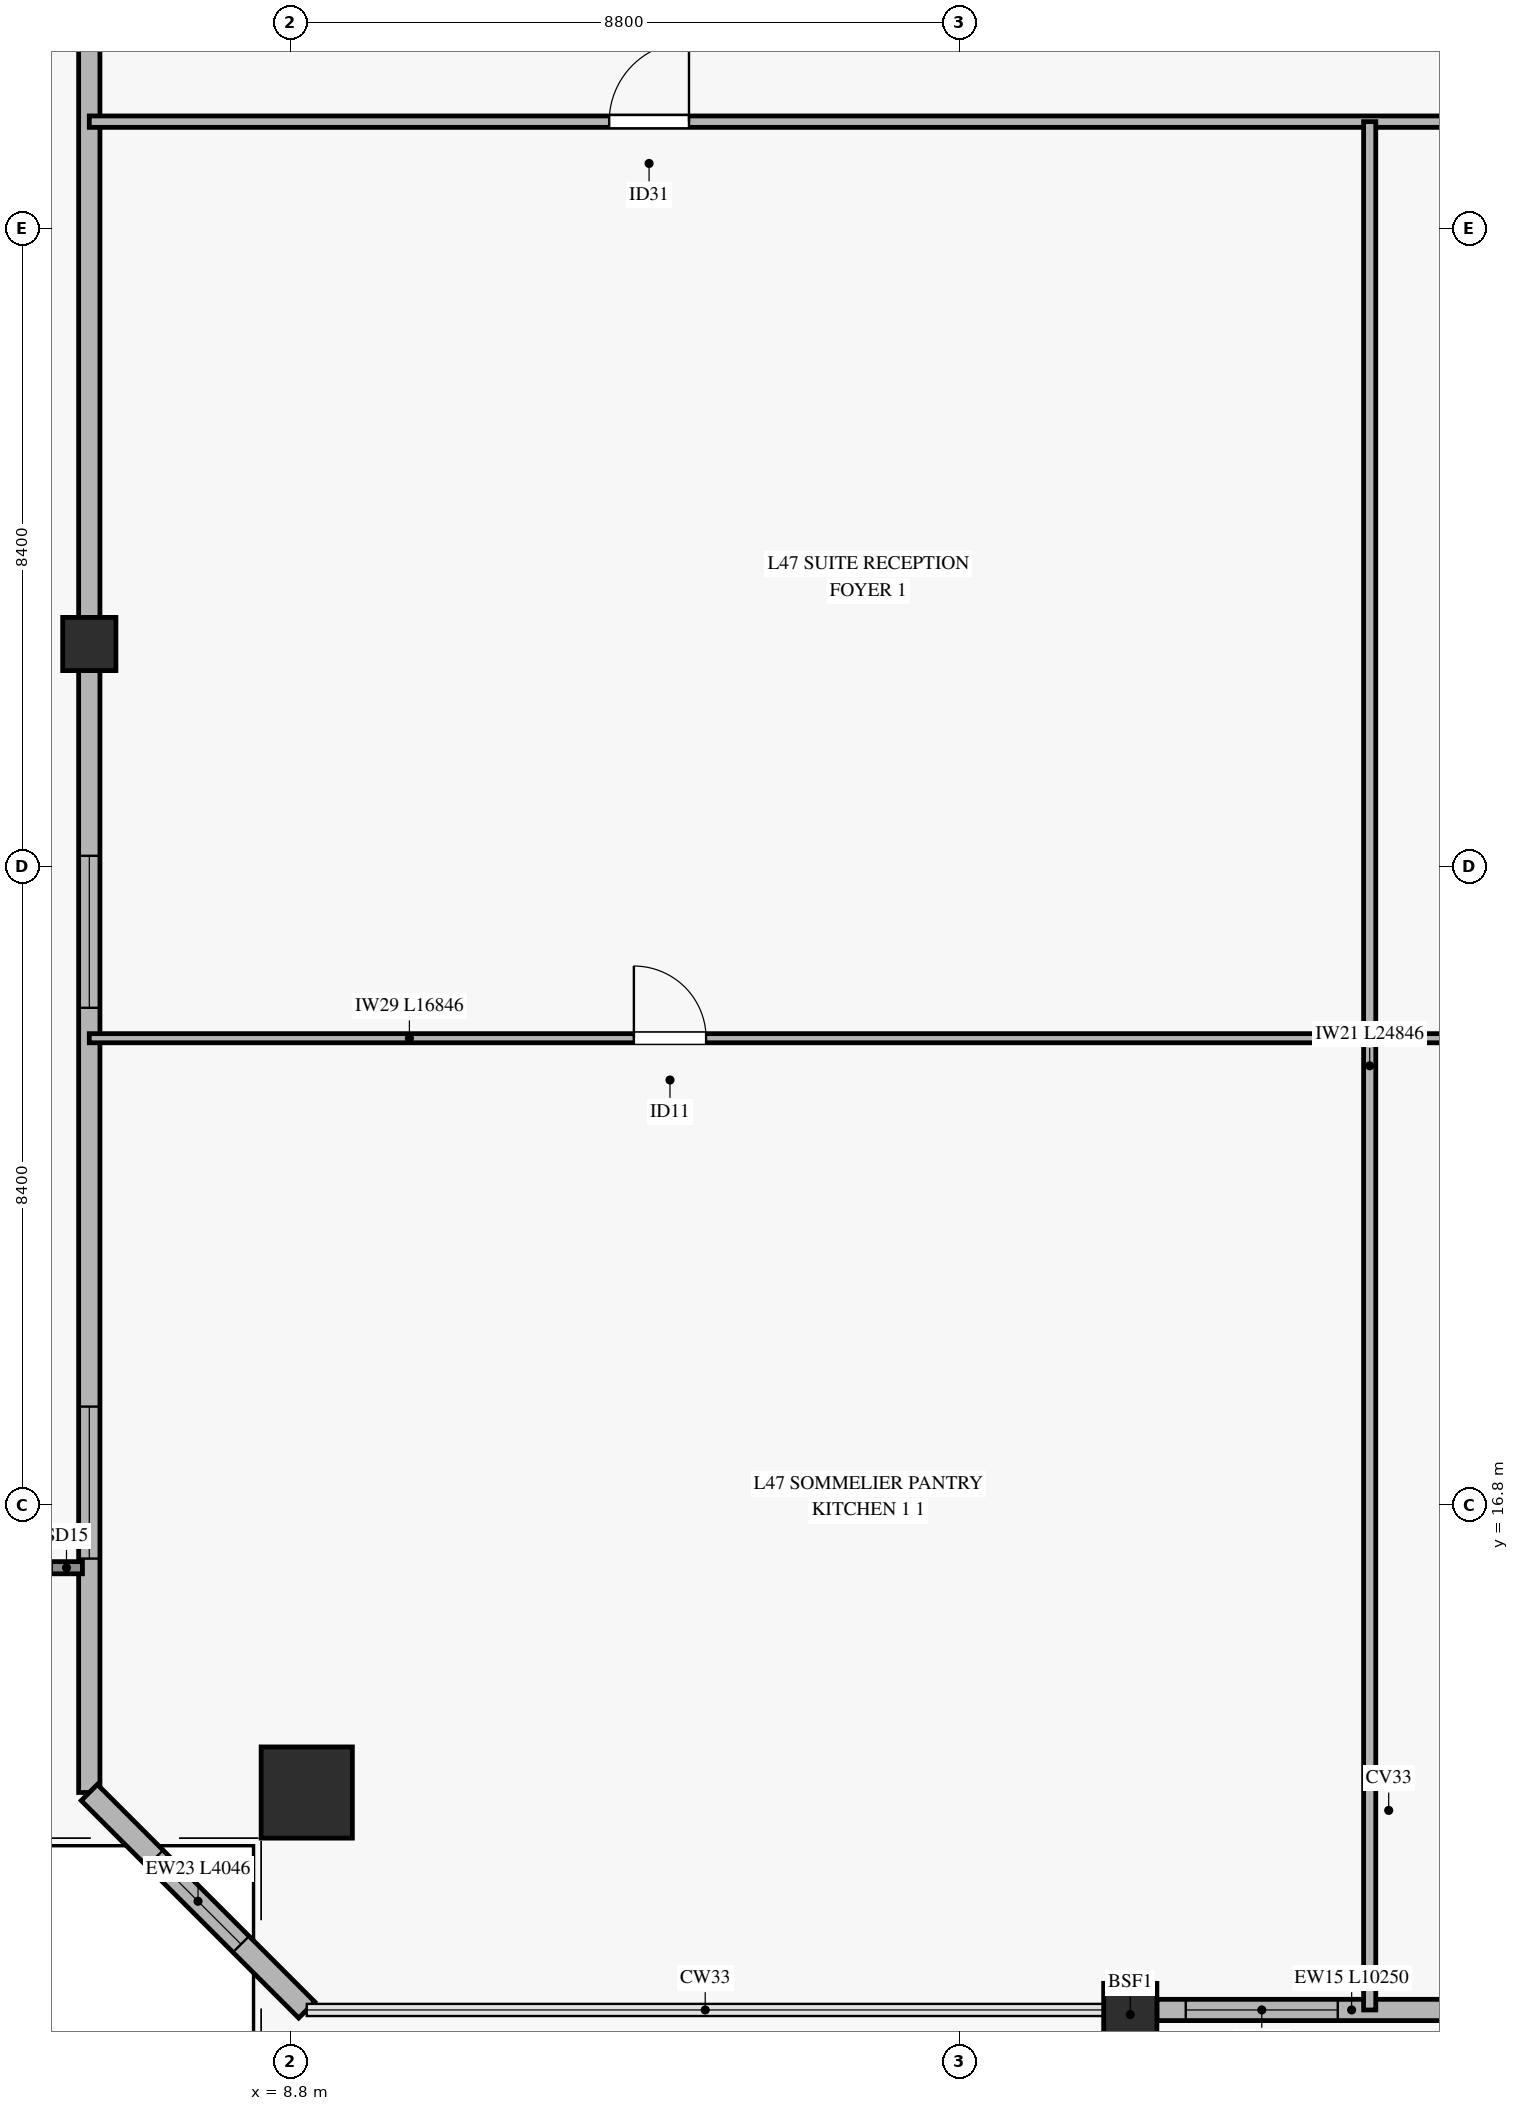
"""IFC4 building model, lengths in metres.
Left out: names, types, materials, properties, quantities, classifications, styles, units other than length and angle.
Written with IfcOpenShell. Run it as: python <this file> out.ifc"""

import sys

from ifc_helpers import new_model, si_unit, direction, frame, frame_2d, origin, origin_2d, place, context, subcontext, project, spatial, rectangle, hollow_rectangle, extrude, source, transform, mapped, element, fill, save


model = new_model("IFC4")
c1 = context("Model", 3, precision=1e-05, world=origin(), true_north=direction((0.0, 1.0)))
c2 = subcontext(c1, "Body", "Model", "MODEL_VIEW")
j1 = project(units=[si_unit("LENGTHUNIT", "METRE"), si_unit("PLANEANGLEUNIT", "RADIAN")], contexts=[c1])
p1 = place(None, origin())
s1 = spatial("IfcSite", under=j1, at=p1, CompositionType="ELEMENT")
p2 = place(p1, origin())
s2 = spatial("IfcBuilding", under=s1, at=p2, CompositionType="ELEMENT")
p3 = place(p2, frame((0.0, 0.0, 187.7)))
s3 = spatial("IfcBuildingStorey", under=s2, at=p3, CompositionType="ELEMENT", Elevation=187.7)
m1 = source(origin(), c2, "Body", "SweptSolid", [
    extrude(hollow_rectangle(XDim=1.2, YDim=1.2, WallThickness=0.055, at=origin_2d()), origin(), (0.0, 0.0, 1.0), 3.265),
])
p4 = place(p3, frame((9.015, 13.015, 0.0), z_axis=(0.064076942579, 0.153126695918, 0.986126949448), x_axis=(-0.922489486146, 0.386022211732, 0.0)))
e1 = element("IfcColumn", 1, at=p4, inside=s3, PredefinedType="COLUMN", context=c2, shape_type="MappedRepresentation", body=[
    mapped(m1, transform((0.0, 0.0, 0.0), x_axis=(1.0, 0.0, 0.0), y_axis=(0.0, 1.0, 0.0), z_axis=(0.0, 0.0, 1.0), scale=1.0)),
])
m2 = source(origin(), c2, "Body", "SweptSolid", [
    extrude(hollow_rectangle(XDim=0.7, YDim=0.7, WallThickness=0.032, at=origin_2d()), origin(), (0.0, 0.0, 1.0), 3.263),
])
p5 = place(p3, frame((19.85, 10.154, 0.0), z_axis=(0.0, 0.161182473027, 0.986924622445), x_axis=(-1.0, 0.0, 0.0)))
e2 = element("IfcColumn", 2, at=p5, inside=s3, PredefinedType="COLUMN", context=c2, shape_type="MappedRepresentation", body=[
    mapped(m2, transform((0.0, 0.0, 0.0), x_axis=(1.0, 0.0, 0.0), y_axis=(0.0, 1.0, 0.0), z_axis=(0.0, 0.0, 1.0), scale=1.0)),
])
m3 = source(origin(), c2, "Body", "SweptSolid", [
    extrude(hollow_rectangle(XDim=0.7, YDim=0.7, WallThickness=0.032, at=origin_2d()), origin(), (0.0, 0.0, 1.0), 3.239),
])
p6 = place(p3, frame((6.154, 28.127, 0.0), z_axis=(0.072506249941, 0.081173836992, 0.994059179278), x_axis=(-0.745802491979, 0.666167128398, 0.0)))
e3 = element("IfcColumn", 3, at=p6, inside=s3, PredefinedType="COLUMN", context=c2, shape_type="MappedRepresentation", body=[
    mapped(m3, transform((0.0, 0.0, 0.0), x_axis=(1.0, 0.0, 0.0), y_axis=(0.0, 1.0, 0.0), z_axis=(0.0, 0.0, 1.0), scale=1.0)),
])
p7 = place(p3, frame((20.2, 10.154, 0.0), z_axis=(0.0, 0.0, 1.0), x_axis=(1.0, 0.0, 0.0)))
e4 = element("IfcWall", 4, at=p7, inside=s3, PredefinedType="SOLIDWALL", context=c2, shape_type="SweptSolid", body=[
    extrude(rectangle(XDim=10.25, YDim=0.28, at=frame_2d((5.125, 0.0))), origin(), (0.0, 0.0, 1.0), 2.7),
])
p8 = place(p7, frame((4.2, 0.0, 0.0)))
e5 = element("IfcOpeningElement", 5, at=p8, cuts=e4, PredefinedType="OPENING", context=c2, shape_type="SweptSolid", body=[
    extrude(rectangle(XDim=1.8, YDim=2.25, at=frame_2d((0.9, 1.125))), frame((0.0, 0.15, 0.0), z_axis=(0.0, -1.0, 0.0), x_axis=(1.0, 0.0, 0.0)), (0.0, 0.0, 1.0), 0.3),
])
p9 = place(p7, frame((0.38, 0.0, 0.35)))
e6 = element("IfcOpeningElement", 6, at=p9, cuts=e4, PredefinedType="OPENING", context=c2, shape_type="SweptSolid", body=[
    extrude(rectangle(XDim=2.0, YDim=2.0, at=frame_2d((1.0, 1.0))), frame((0.0, 0.15, 0.0), z_axis=(0.0, -1.0, 0.0), x_axis=(1.0, 0.0, 0.0)), (0.0, 0.0, 1.0), 0.3),
])
p10 = place(p7, frame((7.35, 0.0, 0.35)))
e7 = element("IfcOpeningElement", 7, at=p10, cuts=e4, PredefinedType="OPENING", context=c2, shape_type="SweptSolid", body=[
    extrude(rectangle(XDim=1.6, YDim=2.0, at=frame_2d((0.8, 1.0))), frame((0.0, 0.15, 0.0), z_axis=(0.0, -1.0, 0.0), x_axis=(1.0, 0.0, 0.0)), (0.0, 0.0, 1.0), 0.3),
])
p11 = place(p3, frame((6.154, 13.015, 0.0), z_axis=(0.0, 0.0, 1.0), x_axis=(0.0, 1.0, 0.0)))
e8 = element("IfcWall", 8, at=p11, inside=s3, PredefinedType="SOLIDWALL", context=c2, shape_type="SweptSolid", body=[
    extrude(rectangle(XDim=14.762, YDim=0.28, at=frame_2d((7.381, 0.0))), origin(), (0.0, 0.0, 1.0), 2.7),
])
p12 = place(p11, frame((3.078, 0.0, 0.45)))
e9 = element("IfcOpeningElement", 9, at=p12, cuts=e8, PredefinedType="OPENING", context=c2, shape_type="SweptSolid", body=[
    extrude(rectangle(XDim=2.0, YDim=2.0, at=frame_2d((1.0, 1.0))), frame((0.0, 0.15, 0.0), z_axis=(0.0, -1.0, 0.0), x_axis=(1.0, 0.0, 0.0)), (0.0, 0.0, 1.0), 0.3),
])
p13 = place(p11, frame((10.325, 0.0, 0.45)))
e10 = element("IfcOpeningElement", 10, at=p13, cuts=e8, PredefinedType="OPENING", context=c2, shape_type="SweptSolid", body=[
    extrude(rectangle(XDim=2.0, YDim=2.0, at=frame_2d((1.0, 1.0))), frame((0.0, 0.15, 0.0), z_axis=(0.0, -1.0, 0.0), x_axis=(1.0, 0.0, 0.0)), (0.0, 0.0, 1.0), 0.3),
])
p14 = place(p3, frame((6.154, 28.477, 0.0), z_axis=(0.0, 0.0, 1.0), x_axis=(0.0, 1.0, 0.0)))
e11 = element("IfcWall", 11, at=p14, inside=s3, PredefinedType="SOLIDWALL", context=c2, shape_type="SweptSolid", body=[
    extrude(rectangle(XDim=14.762, YDim=0.28, at=frame_2d((7.381, 0.0))), origin(), (0.0, 0.0, 1.0), 2.7),
])
p15 = place(p14, frame((9.378, 0.0, 0.45)))
e12 = element("IfcOpeningElement", 12, at=p15, cuts=e11, PredefinedType="OPENING", context=c2, shape_type="SweptSolid", body=[
    extrude(rectangle(XDim=2.0, YDim=2.0, at=frame_2d((1.0, 1.0))), frame((0.0, 0.15, 0.0), z_axis=(0.0, -1.0, 0.0), x_axis=(1.0, 0.0, 0.0)), (0.0, 0.0, 1.0), 0.3),
])
p16 = place(p3, frame((6.154, 13.015, 0.0), z_axis=(0.0, 0.0, 1.0), x_axis=(0.707106781187, -0.707106781187, 0.0)))
e13 = element("IfcWall", 13, at=p16, inside=s3, PredefinedType="SOLIDWALL", context=c2, shape_type="SweptSolid", body=[
    extrude(rectangle(XDim=4.046, YDim=0.3, at=frame_2d((2.023, 0.0))), origin(), (0.0, 0.0, 1.0), 2.7),
])
p17 = place(p16, frame((1.223, 0.0, 0.45)))
e14 = element("IfcOpeningElement", 14, at=p17, cuts=e13, PredefinedType="OPENING", context=c2, shape_type="SweptSolid", body=[
    extrude(rectangle(XDim=1.6, YDim=2.0, at=frame_2d((0.8, 1.0))), frame((0.0, 0.16, 0.0), z_axis=(0.0, -1.0, 0.0), x_axis=(1.0, 0.0, 0.0)), (0.0, 0.0, 1.0), 0.32),
])
p18 = place(p3, frame((6.154, 35.0, 0.0), z_axis=(0.0, 0.0, 1.0), x_axis=(1.0, 0.0, 0.0)))
e15 = element("IfcWall", 15, at=p18, inside=s3, PredefinedType="PARTITIONING", context=c2, shape_type="SweptSolid", body=[
    extrude(rectangle(XDim=58.093, YDim=0.15, at=frame_2d((29.046, 0.0))), origin(), (0.0, 0.0, 1.0), 2.405),
])
p19 = place(p18, frame((6.84, 0.0, 0.0)))
e16 = element("IfcOpeningElement", 16, at=p19, cuts=e15, PredefinedType="OPENING", context=c2, shape_type="SweptSolid", body=[
    extrude(rectangle(XDim=1.05, YDim=2.15, at=frame_2d((0.525, 1.075))), frame((0.0, 0.085, 0.0), z_axis=(0.0, -1.0, 0.0), x_axis=(1.0, 0.0, 0.0)), (0.0, 0.0, 1.0), 0.17),
])
p20 = place(p18, frame((19.523, 0.0, 0.0)))
e17 = element("IfcOpeningElement", 17, at=p20, cuts=e15, PredefinedType="OPENING", context=c2, shape_type="SweptSolid", body=[
    extrude(rectangle(XDim=1.05, YDim=2.15, at=frame_2d((0.525, 1.075))), frame((0.0, 0.085, 0.0), z_axis=(0.0, -1.0, 0.0), x_axis=(1.0, 0.0, 0.0)), (0.0, 0.0, 1.0), 0.17),
])
p21 = place(p18, frame((26.123, 0.0, 0.0)))
e18 = element("IfcOpeningElement", 18, at=p21, cuts=e15, PredefinedType="OPENING", context=c2, shape_type="SweptSolid", body=[
    extrude(rectangle(XDim=1.05, YDim=2.15, at=frame_2d((0.525, 1.075))), frame((0.0, 0.085, 0.0), z_axis=(0.0, -1.0, 0.0), x_axis=(1.0, 0.0, 0.0)), (0.0, 0.0, 1.0), 0.17),
])
p22 = place(p18, frame((32.616, 0.0, 0.0)))
e19 = element("IfcOpeningElement", 19, at=p22, cuts=e15, PredefinedType="OPENING", context=c2, shape_type="SweptSolid", body=[
    extrude(rectangle(XDim=1.05, YDim=2.15, at=frame_2d((0.525, 1.075))), frame((0.0, 0.085, 0.0), z_axis=(0.0, -1.0, 0.0), x_axis=(1.0, 0.0, 0.0)), (0.0, 0.0, 1.0), 0.17),
])
p23 = place(p18, frame((44.8, 0.0, 0.0)))
e20 = element("IfcOpeningElement", 20, at=p23, cuts=e15, PredefinedType="OPENING", context=c2, shape_type="SweptSolid", body=[
    extrude(rectangle(XDim=1.05, YDim=2.15, at=frame_2d((0.525, 1.075))), frame((0.0, 0.085, 0.0), z_axis=(0.0, -1.0, 0.0), x_axis=(1.0, 0.0, 0.0)), (0.0, 0.0, 1.0), 0.17),
])
p24 = place(p3, frame((6.154, 22.94, 0.0), z_axis=(0.0, 0.0, 1.0), x_axis=(1.0, 0.0, 0.0)))
e21 = element("IfcWall", 21, at=p24, inside=s3, PredefinedType="PARTITIONING", context=c2, shape_type="SweptSolid", body=[
    extrude(rectangle(XDim=16.846, YDim=0.12, at=frame_2d((8.423, 0.0))), origin(), (0.0, 0.0, 1.0), 2.405),
])
p25 = place(p24, frame((7.165, 0.0, 0.0)))
e22 = element("IfcOpeningElement", 22, at=p25, cuts=e21, PredefinedType="OPENING", context=c2, shape_type="SweptSolid", body=[
    extrude(rectangle(XDim=0.95, YDim=2.1, at=frame_2d((0.475, 1.05))), frame((0.0, 0.07, 0.0), z_axis=(0.0, -1.0, 0.0), x_axis=(1.0, 0.0, 0.0)), (0.0, 0.0, 1.0), 0.14),
])
p26 = place(p3, frame((23.0, 10.154, 0.0), z_axis=(0.0, 0.0, 1.0), x_axis=(0.0, 1.0, 0.0)))
e23 = element("IfcWall", 23, at=p26, inside=s3, PredefinedType="PARTITIONING", context=c2, shape_type="SweptSolid", body=[
    extrude(rectangle(XDim=24.846, YDim=0.16, at=frame_2d((12.423, 0.0))), origin(), (0.0, 0.0, 1.0), 2.705),
])
p27 = place(p3, frame((23.0, 22.94, 0.0), z_axis=(0.0, 0.0, 1.0), x_axis=(1.0, 0.0, 0.0)))
e24 = element("IfcWall", 24, at=p27, inside=s3, PredefinedType="PARTITIONING", context=c2, shape_type="SweptSolid", body=[
    extrude(rectangle(XDim=6.6, YDim=0.12, at=frame_2d((3.3, 0.0))), origin(), (0.0, 0.0, 1.0), 3.22),
])
p28 = place(p27, frame((2.806, 0.0, 0.0)))
e25 = element("IfcOpeningElement", 25, at=p28, cuts=e24, PredefinedType="OPENING", context=c2, shape_type="SweptSolid", body=[
    extrude(rectangle(XDim=0.95, YDim=2.1, at=frame_2d((0.475, 1.05))), frame((0.0, 0.07, 0.0), z_axis=(0.0, -1.0, 0.0), x_axis=(1.0, 0.0, 0.0)), (0.0, 0.0, 1.0), 0.14),
])
m4 = source(origin(), c2, "Body", "SweptSolid", [
    extrude(rectangle(XDim=2.0, YDim=2.0, at=frame_2d((1.0, 1.0))), frame((0.0, 0.03, 0.0), z_axis=(0.0, -1.0, 0.0), x_axis=(1.0, 0.0, 0.0)), (0.0, 0.0, 1.0), 0.06),
])
p29 = place(p9, origin())
e26 = element("IfcWindow", 26, at=p29, inside=s3, PartitioningType="SINGLE_PANEL", PredefinedType="WINDOW", context=c2, shape_type="MappedRepresentation", body=[
    mapped(m4, transform((0.0, 0.0, 0.0), x_axis=(1.0, 0.0, 0.0), y_axis=(0.0, 1.0, 0.0), z_axis=(0.0, 0.0, 1.0), scale=1.0)),
])
fill(e6, e26)
p30 = place(p12, origin())
e27 = element("IfcWindow", 27, at=p30, inside=s3, PartitioningType="SINGLE_PANEL", PredefinedType="WINDOW", context=c2, shape_type="MappedRepresentation", body=[
    mapped(m4, transform((0.0, 0.0, 0.0), x_axis=(1.0, 0.0, 0.0), y_axis=(0.0, 1.0, 0.0), z_axis=(0.0, 0.0, 1.0), scale=1.0)),
])
fill(e9, e27)
p31 = place(p13, origin())
e28 = element("IfcWindow", 28, at=p31, inside=s3, PartitioningType="SINGLE_PANEL", PredefinedType="WINDOW", context=c2, shape_type="MappedRepresentation", body=[
    mapped(m4, transform((0.0, 0.0, 0.0), x_axis=(1.0, 0.0, 0.0), y_axis=(0.0, 1.0, 0.0), z_axis=(0.0, 0.0, 1.0), scale=1.0)),
])
fill(e10, e28)
m5 = source(origin(), c2, "Body", "SweptSolid", [
    extrude(rectangle(XDim=1.6, YDim=2.0, at=frame_2d((0.8, 1.0))), frame((0.0, 0.03, 0.0), z_axis=(0.0, -1.0, 0.0), x_axis=(1.0, 0.0, 0.0)), (0.0, 0.0, 1.0), 0.06),
])
p32 = place(p17, origin())
e29 = element("IfcWindow", 29, at=p32, inside=s3, PartitioningType="SINGLE_PANEL", PredefinedType="WINDOW", context=c2, shape_type="MappedRepresentation", body=[
    mapped(m5, transform((0.0, 0.0, 0.0), x_axis=(1.0, 0.0, 0.0), y_axis=(0.0, 1.0, 0.0), z_axis=(0.0, 0.0, 1.0), scale=1.0)),
])
fill(e14, e29)
m6 = source(origin(), c2, "Body", "SweptSolid", [
    extrude(rectangle(XDim=1.05, YDim=2.15, at=frame_2d((0.525, 1.075))), frame((0.0, 0.025, 0.0), z_axis=(0.0, -1.0, 0.0), x_axis=(1.0, 0.0, 0.0)), (0.0, 0.0, 1.0), 0.05),
])
p33 = place(p19, origin())
e30 = element("IfcDoor", 30, at=p33, inside=s3, OperationType="SINGLE_SWING_RIGHT", PredefinedType="DOOR", context=c2, shape_type="MappedRepresentation", body=[
    mapped(m6, transform((0.0, 0.0, 0.0), x_axis=(1.0, 0.0, 0.0), y_axis=(0.0, 1.0, 0.0), z_axis=(0.0, 0.0, 1.0), scale=1.0)),
])
fill(e16, e30)
m7 = source(origin(), c2, "Body", "SweptSolid", [
    extrude(rectangle(XDim=0.95, YDim=2.1, at=frame_2d((0.475, 1.05))), frame((0.0, 0.025, 0.0), z_axis=(0.0, -1.0, 0.0), x_axis=(1.0, 0.0, 0.0)), (0.0, 0.0, 1.0), 0.05),
])
p34 = place(p25, origin())
e31 = element("IfcDoor", 31, at=p34, inside=s3, OperationType="SINGLE_SWING_LEFT", PredefinedType="DOOR", context=c2, shape_type="MappedRepresentation", body=[
    mapped(m7, transform((0.0, 0.0, 0.0), x_axis=(1.0, 0.0, 0.0), y_axis=(0.0, 1.0, 0.0), z_axis=(0.0, 0.0, 1.0), scale=1.0)),
])
fill(e22, e31)
save(model, sys.argv[1])
